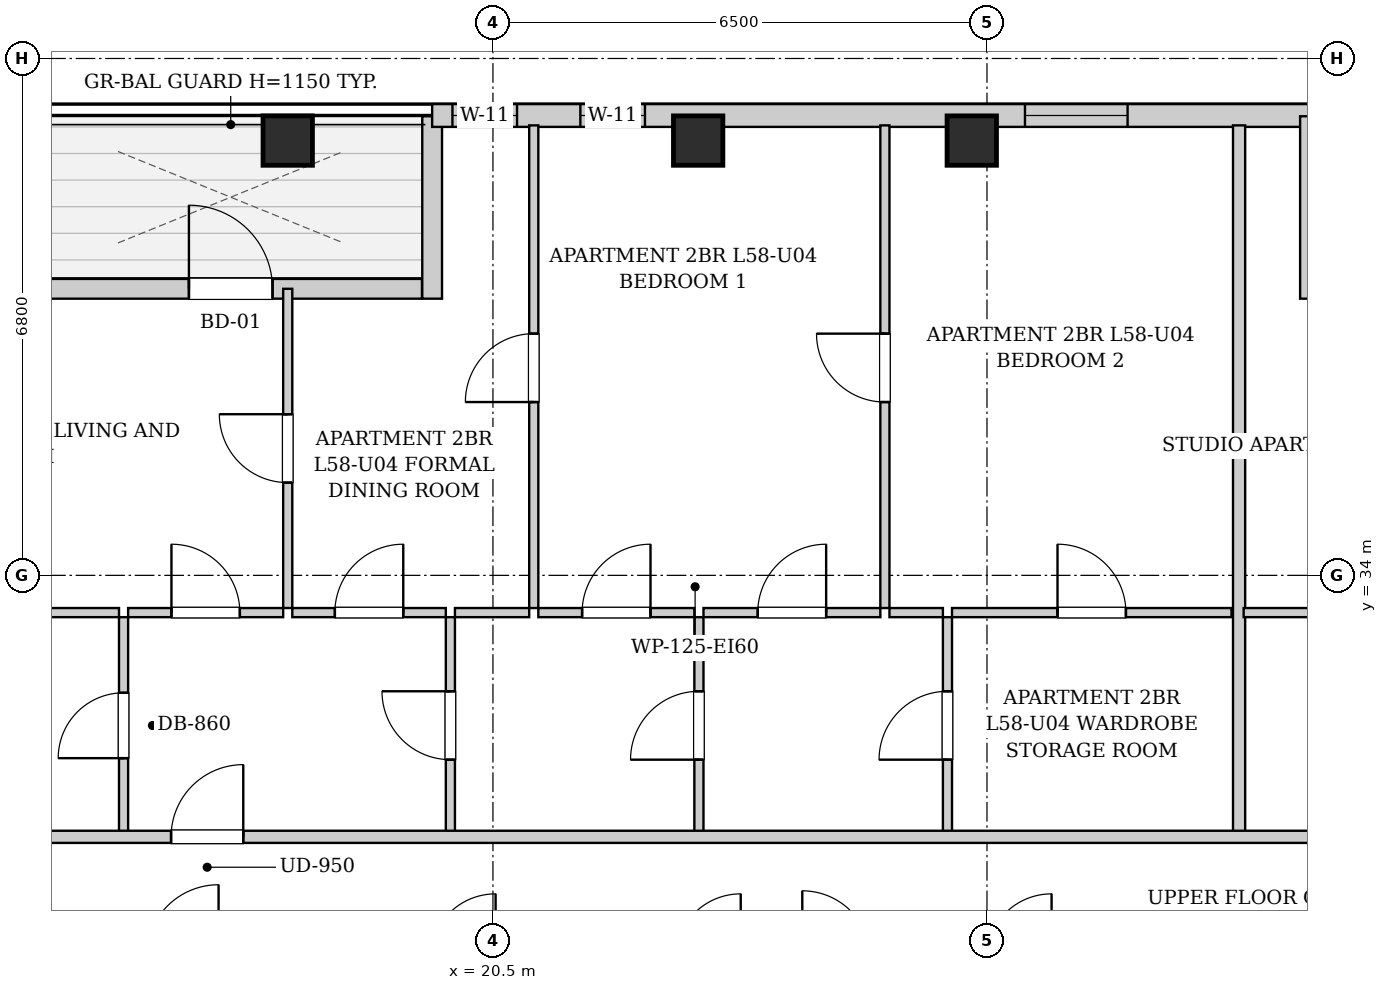
"""IFC4 building model, lengths in metres.
Left out: names, types, materials, properties, quantities, classifications, styles, units other than length and angle.
Written with IfcOpenShell. Run it as: python <this file> out.ifc"""

import sys

from ifc_helpers import new_model, si_unit, direction, frame, frame_2d, origin, origin_2d, place, context, subcontext, project, spatial, rectangle, extrude, element, fill, save


model = new_model("IFC4")
c1 = context("Model", 3, precision=1e-05, world=origin(), true_north=direction((0.0, 1.0)))
c2 = subcontext(c1, "Body", "Model", "MODEL_VIEW")
j1 = project(units=[si_unit("LENGTHUNIT", "METRE"), si_unit("PLANEANGLEUNIT", "RADIAN")], contexts=[c1])
p1 = place(None, origin())
s1 = spatial("IfcSite", under=j1, at=p1, CompositionType="ELEMENT")
p2 = place(p1, origin())
s2 = spatial("IfcBuilding", under=s1, at=p2, CompositionType="ELEMENT")
p3 = place(p2, frame((0.0, 0.0, 200.8)))
s3 = spatial("IfcBuildingStorey", under=s2, at=p3, CompositionType="ELEMENT", Elevation=200.8)
for number, where, z_axis, x_axis in (
    (1, (17.8, 39.72, 0.0), (0.0, 0.0, 1.0), (1.0, 0.0, 0.0)),
    (2, (23.2, 39.72, 0.0), (0.0, 0.0, 1.0), (1.0, 0.0, 0.0)),
    (3, (26.8, 39.72, 0.0), (0.0, 0.0, 1.0), (1.0, 0.0, 0.0)),
):
    element("IfcColumn", number, at=place(p3, frame(where, z_axis=z_axis, x_axis=x_axis)), inside=s3, PredefinedType="COLUMN", context=c2, shape_type="SweptSolid", body=[
        extrude(rectangle(XDim=0.65, YDim=0.65, at=origin_2d()), origin(), (0.0, 0.0, 1.0), 3.3),
    ])
p4 = place(p3, frame((14.534, 37.77, 0.0), z_axis=(0.0, 0.0, 1.0), x_axis=(1.0, 0.0, 0.0)))
e4 = element("IfcWall", 4, at=p4, inside=s3, PredefinedType="SOLIDWALL", context=c2, shape_type="SweptSolid", body=[
    extrude(rectangle(XDim=5.032, YDim=0.26, at=frame_2d((2.516, 0.0))), origin(), (0.0, 0.0, 1.0), 3.04),
])
p5 = place(p4, frame((1.966, 0.0, 0.0)))
e5 = element("IfcOpeningElement", 5, at=p5, cuts=e4, PredefinedType="OPENING", context=c2, shape_type="SweptSolid", body=[
    extrude(rectangle(XDim=1.1, YDim=2.0, at=frame_2d((0.55, 1.0))), frame((0.0, 0.14, 0.0), z_axis=(0.0, -1.0, 0.0), x_axis=(1.0, 0.0, 0.0)), (0.0, 0.0, 1.0), 0.28),
])
p6 = place(p3, frame((19.7, 37.64, 0.0), z_axis=(0.0, 0.0, 1.0), x_axis=(0.0, 1.0, 0.0)))
e6 = element("IfcWall", 6, at=p6, inside=s3, PredefinedType="SOLIDWALL", context=c2, shape_type="SweptSolid", body=[
    extrude(rectangle(XDim=2.4, YDim=0.26, at=frame_2d((1.2, 0.0))), origin(), (0.0, 0.0, 1.0), 3.04),
])
p7 = place(p3, frame((19.7, 40.05, 0.0), z_axis=(0.0, 0.0, 1.0), x_axis=(1.0, 0.0, 0.0)))
e7 = element("IfcWall", 7, at=p7, inside=s3, PredefinedType="SOLIDWALL", context=c2, shape_type="SweptSolid", body=[
    extrude(rectangle(XDim=11.55, YDim=0.3, at=frame_2d((5.775, 0.0))), origin(), (0.0, 0.0, 1.0), 3.04),
])
p8 = place(p7, frame((0.267, 0.0, 0.55)))
e8 = element("IfcOpeningElement", 8, at=p8, cuts=e7, PredefinedType="OPENING", context=c2, shape_type="SweptSolid", body=[
    extrude(rectangle(XDim=0.85, YDim=1.2, at=frame_2d((0.425, 0.6))), frame((0.0, 0.16, 0.0), z_axis=(0.0, -1.0, 0.0), x_axis=(1.0, 0.0, 0.0)), (0.0, 0.0, 1.0), 0.32),
])
p9 = place(p7, frame((1.95, 0.0, 0.55)))
e9 = element("IfcOpeningElement", 9, at=p9, cuts=e7, PredefinedType="OPENING", context=c2, shape_type="SweptSolid", body=[
    extrude(rectangle(XDim=0.85, YDim=1.2, at=frame_2d((0.425, 0.6))), frame((0.0, 0.16, 0.0), z_axis=(0.0, -1.0, 0.0), x_axis=(1.0, 0.0, 0.0)), (0.0, 0.0, 1.0), 0.32),
])
p10 = place(p7, frame((7.8, 0.0, 0.55)))
e10 = element("IfcOpeningElement", 10, at=p10, cuts=e7, PredefinedType="OPENING", context=c2, shape_type="SweptSolid", body=[
    extrude(rectangle(XDim=1.35, YDim=1.2, at=frame_2d((0.675, 0.6))), frame((0.0, 0.16, 0.0), z_axis=(0.0, -1.0, 0.0), x_axis=(1.0, 0.0, 0.0)), (0.0, 0.0, 1.0), 0.32),
])
p11 = place(p3, frame((31.25, 40.04, 0.0), z_axis=(0.0, 0.0, 1.0), x_axis=(0.0, -1.0, 0.0)))
e11 = element("IfcWall", 11, at=p11, inside=s3, PredefinedType="SOLIDWALL", context=c2, shape_type="SweptSolid", body=[
    extrude(rectangle(XDim=2.4, YDim=0.26, at=frame_2d((1.2, 0.0))), origin(), (0.0, 0.0, 1.0), 3.04),
])
p12 = place(p3, frame((15.64, 30.6, 0.0), z_axis=(0.0, 0.0, 1.0), x_axis=(0.0, 1.0, 0.0)))
e12 = element("IfcWall", 12, at=p12, inside=s3, PredefinedType="PARTITIONING", context=c2, shape_type="SweptSolid", body=[
    extrude(rectangle(XDim=2.85, YDim=0.12, at=frame_2d((1.425, 0.0))), origin(), (0.0, 0.0, 1.0), 3.04),
])
p13 = place(p12, frame((0.995, 0.0, 0.0)))
e13 = element("IfcOpeningElement", 13, at=p13, cuts=e12, PredefinedType="OPENING", context=c2, shape_type="SweptSolid", body=[
    extrude(rectangle(XDim=0.86, YDim=2.05, at=frame_2d((0.43, 1.025))), frame((0.0, 0.07, 0.0), z_axis=(0.0, -1.0, 0.0), x_axis=(1.0, 0.0, 0.0)), (0.0, 0.0, 1.0), 0.14),
])
p14 = place(p3, frame((13.18, 33.51, 0.0), z_axis=(0.0, 0.0, 1.0), x_axis=(1.0, 0.0, 0.0)))
e14 = element("IfcWall", 14, at=p14, inside=s3, PredefinedType="PARTITIONING", context=c2, shape_type="SweptSolid", body=[
    extrude(rectangle(XDim=2.4, YDim=0.12, at=frame_2d((1.2, 0.0))), origin(), (0.0, 0.0, 1.0), 3.04),
])
p15 = place(p3, frame((19.94, 30.6, 0.0), z_axis=(0.0, 0.0, 1.0), x_axis=(0.0, 1.0, 0.0)))
e15 = element("IfcWall", 15, at=p15, inside=s3, PredefinedType="PARTITIONING", context=c2, shape_type="SweptSolid", body=[
    extrude(rectangle(XDim=2.85, YDim=0.12, at=frame_2d((1.425, 0.0))), origin(), (0.0, 0.0, 1.0), 3.04),
])
p16 = place(p15, frame((0.975, 0.0, 0.0)))
e16 = element("IfcOpeningElement", 16, at=p16, cuts=e15, PredefinedType="OPENING", context=c2, shape_type="SweptSolid", body=[
    extrude(rectangle(XDim=0.9, YDim=2.05, at=frame_2d((0.45, 1.025))), frame((0.0, 0.07, 0.0), z_axis=(0.0, -1.0, 0.0), x_axis=(1.0, 0.0, 0.0)), (0.0, 0.0, 1.0), 0.14),
])
p17 = place(p3, frame((15.7, 33.51, 0.0), z_axis=(0.0, 0.0, 1.0), x_axis=(1.0, 0.0, 0.0)))
e17 = element("IfcWall", 17, at=p17, inside=s3, PredefinedType="PARTITIONING", context=c2, shape_type="SweptSolid", body=[
    extrude(rectangle(XDim=2.04, YDim=0.12, at=frame_2d((1.02, 0.0))), origin(), (0.0, 0.0, 1.0), 3.04),
])
p18 = place(p17, frame((0.57, 0.0, 0.0)))
e18 = element("IfcOpeningElement", 18, at=p18, cuts=e17, PredefinedType="OPENING", context=c2, shape_type="SweptSolid", body=[
    extrude(rectangle(XDim=0.9, YDim=2.05, at=frame_2d((0.45, 1.025))), frame((0.0, 0.07, 0.0), z_axis=(0.0, -1.0, 0.0), x_axis=(1.0, 0.0, 0.0)), (0.0, 0.0, 1.0), 0.14),
])
p19 = place(p3, frame((17.86, 33.51, 0.0), z_axis=(0.0, 0.0, 1.0), x_axis=(1.0, 0.0, 0.0)))
e19 = element("IfcWall", 19, at=p19, inside=s3, PredefinedType="PARTITIONING", context=c2, shape_type="SweptSolid", body=[
    extrude(rectangle(XDim=2.02, YDim=0.12, at=frame_2d((1.01, 0.0))), origin(), (0.0, 0.0, 1.0), 3.04),
])
p20 = place(p19, frame((0.56, 0.0, 0.0)))
e20 = element("IfcOpeningElement", 20, at=p20, cuts=e19, PredefinedType="OPENING", context=c2, shape_type="SweptSolid", body=[
    extrude(rectangle(XDim=0.9, YDim=2.05, at=frame_2d((0.45, 1.025))), frame((0.0, 0.07, 0.0), z_axis=(0.0, -1.0, 0.0), x_axis=(1.0, 0.0, 0.0)), (0.0, 0.0, 1.0), 0.14),
])
p21 = place(p3, frame((23.21, 30.6, 0.0), z_axis=(0.0, 0.0, 1.0), x_axis=(0.0, 1.0, 0.0)))
e21 = element("IfcWall", 21, at=p21, inside=s3, PredefinedType="PARTITIONING", context=c2, shape_type="SweptSolid", body=[
    extrude(rectangle(XDim=2.85, YDim=0.12, at=frame_2d((1.425, 0.0))), origin(), (0.0, 0.0, 1.0), 3.04),
])
p22 = place(p21, frame((0.975, 0.0, 0.0)))
e22 = element("IfcOpeningElement", 22, at=p22, cuts=e21, PredefinedType="OPENING", context=c2, shape_type="SweptSolid", body=[
    extrude(rectangle(XDim=0.9, YDim=2.05, at=frame_2d((0.45, 1.025))), frame((0.0, 0.07, 0.0), z_axis=(0.0, -1.0, 0.0), x_axis=(1.0, 0.0, 0.0)), (0.0, 0.0, 1.0), 0.14),
])
p23 = place(p3, frame((20.0, 33.51, 0.0), z_axis=(0.0, 0.0, 1.0), x_axis=(1.0, 0.0, 0.0)))
e23 = element("IfcWall", 23, at=p23, inside=s3, PredefinedType="PARTITIONING", context=c2, shape_type="SweptSolid", body=[
    extrude(rectangle(XDim=0.977, YDim=0.12, at=frame_2d((0.489, 0.0))), origin(), (0.0, 0.0, 1.0), 3.04),
])
p24 = place(p3, frame((21.097, 33.51, 0.0), z_axis=(0.0, 0.0, 1.0), x_axis=(1.0, 0.0, 0.0)))
e24 = element("IfcWall", 24, at=p24, inside=s3, PredefinedType="PARTITIONING", context=c2, shape_type="SweptSolid", body=[
    extrude(rectangle(XDim=2.053, YDim=0.12, at=frame_2d((1.026, 0.0))), origin(), (0.0, 0.0, 1.0), 3.04),
])
p25 = place(p24, frame((0.576, 0.0, 0.0)))
e25 = element("IfcOpeningElement", 25, at=p25, cuts=e24, PredefinedType="OPENING", context=c2, shape_type="SweptSolid", body=[
    extrude(rectangle(XDim=0.9, YDim=2.05, at=frame_2d((0.45, 1.025))), frame((0.0, 0.07, 0.0), z_axis=(0.0, -1.0, 0.0), x_axis=(1.0, 0.0, 0.0)), (0.0, 0.0, 1.0), 0.14),
])
p26 = place(p3, frame((26.48, 30.6, 0.0), z_axis=(0.0, 0.0, 1.0), x_axis=(0.0, 1.0, 0.0)))
e26 = element("IfcWall", 26, at=p26, inside=s3, PredefinedType="PARTITIONING", context=c2, shape_type="SweptSolid", body=[
    extrude(rectangle(XDim=2.85, YDim=0.12, at=frame_2d((1.425, 0.0))), origin(), (0.0, 0.0, 1.0), 3.04),
])
p27 = place(p26, frame((0.975, 0.0, 0.0)))
e27 = element("IfcOpeningElement", 27, at=p27, cuts=e26, PredefinedType="OPENING", context=c2, shape_type="SweptSolid", body=[
    extrude(rectangle(XDim=0.9, YDim=2.05, at=frame_2d((0.45, 1.025))), frame((0.0, 0.07, 0.0), z_axis=(0.0, -1.0, 0.0), x_axis=(1.0, 0.0, 0.0)), (0.0, 0.0, 1.0), 0.14),
])
p28 = place(p3, frame((23.27, 33.51, 0.0), z_axis=(0.0, 0.0, 1.0), x_axis=(1.0, 0.0, 0.0)))
e28 = element("IfcWall", 28, at=p28, inside=s3, PredefinedType="PARTITIONING", context=c2, shape_type="SweptSolid", body=[
    extrude(rectangle(XDim=2.327, YDim=0.12, at=frame_2d((1.164, 0.0))), origin(), (0.0, 0.0, 1.0), 3.04),
])
p29 = place(p28, frame((0.714, 0.0, 0.0)))
e29 = element("IfcOpeningElement", 29, at=p29, cuts=e28, PredefinedType="OPENING", context=c2, shape_type="SweptSolid", body=[
    extrude(rectangle(XDim=0.9, YDim=2.05, at=frame_2d((0.45, 1.025))), frame((0.0, 0.07, 0.0), z_axis=(0.0, -1.0, 0.0), x_axis=(1.0, 0.0, 0.0)), (0.0, 0.0, 1.0), 0.14),
])
p30 = place(p3, frame((25.717, 33.51, 0.0), z_axis=(0.0, 0.0, 1.0), x_axis=(1.0, 0.0, 0.0)))
e30 = element("IfcWall", 30, at=p30, inside=s3, PredefinedType="PARTITIONING", context=c2, shape_type="SweptSolid", body=[
    extrude(rectangle(XDim=0.703, YDim=0.12, at=frame_2d((0.352, 0.0))), origin(), (0.0, 0.0, 1.0), 3.04),
])
p31 = place(p3, frame((26.54, 33.51, 0.0), z_axis=(0.0, 0.0, 1.0), x_axis=(1.0, 0.0, 0.0)))
e31 = element("IfcWall", 31, at=p31, inside=s3, PredefinedType="PARTITIONING", context=c2, shape_type="SweptSolid", body=[
    extrude(rectangle(XDim=3.677, YDim=0.12, at=frame_2d((1.838, 0.0))), origin(), (0.0, 0.0, 1.0), 3.04),
])
p32 = place(p31, frame((1.388, 0.0, 0.0)))
e32 = element("IfcOpeningElement", 32, at=p32, cuts=e31, PredefinedType="OPENING", context=c2, shape_type="SweptSolid", body=[
    extrude(rectangle(XDim=0.9, YDim=2.05, at=frame_2d((0.45, 1.025))), frame((0.0, 0.07, 0.0), z_axis=(0.0, -1.0, 0.0), x_axis=(1.0, 0.0, 0.0)), (0.0, 0.0, 1.0), 0.14),
])
p33 = place(p3, frame((17.8, 33.57, 0.0), z_axis=(0.0, 0.0, 1.0), x_axis=(0.0, 1.0, 0.0)))
e33 = element("IfcWall", 33, at=p33, inside=s3, PredefinedType="PARTITIONING", context=c2, shape_type="SweptSolid", body=[
    extrude(rectangle(XDim=4.2, YDim=0.12, at=frame_2d((2.1, 0.0))), origin(), (0.0, 0.0, 1.0), 2.556),
])
p34 = place(p33, frame((1.65, 0.0, 0.0)))
e34 = element("IfcOpeningElement", 34, at=p34, cuts=e33, PredefinedType="OPENING", context=c2, shape_type="SweptSolid", body=[
    extrude(rectangle(XDim=0.9, YDim=2.05, at=frame_2d((0.45, 1.025))), frame((0.0, 0.07, 0.0), z_axis=(0.0, -1.0, 0.0), x_axis=(1.0, 0.0, 0.0)), (0.0, 0.0, 1.0), 0.14),
])
p35 = place(p3, frame((21.037, 33.57, 0.0), z_axis=(0.0, 0.0, 1.0), x_axis=(0.0, 1.0, 0.0)))
e35 = element("IfcWall", 35, at=p35, inside=s3, PredefinedType="PARTITIONING", context=c2, shape_type="SweptSolid", body=[
    extrude(rectangle(XDim=6.35, YDim=0.12, at=frame_2d((3.175, 0.0))), origin(), (0.0, 0.0, 1.0), 3.04),
])
p36 = place(p35, frame((2.71, 0.0, 0.0)))
e36 = element("IfcOpeningElement", 36, at=p36, cuts=e35, PredefinedType="OPENING", context=c2, shape_type="SweptSolid", body=[
    extrude(rectangle(XDim=0.9, YDim=2.05, at=frame_2d((0.45, 1.025))), frame((0.0, 0.07, 0.0), z_axis=(0.0, -1.0, 0.0), x_axis=(1.0, 0.0, 0.0)), (0.0, 0.0, 1.0), 0.14),
])
p37 = place(p3, frame((25.657, 33.57, 0.0), z_axis=(0.0, 0.0, 1.0), x_axis=(0.0, 1.0, 0.0)))
e37 = element("IfcWall", 37, at=p37, inside=s3, PredefinedType="PARTITIONING", context=c2, shape_type="SweptSolid", body=[
    extrude(rectangle(XDim=6.35, YDim=0.12, at=frame_2d((3.175, 0.0))), origin(), (0.0, 0.0, 1.0), 3.04),
])
p38 = place(p37, frame((2.71, 0.0, 0.0)))
e38 = element("IfcOpeningElement", 38, at=p38, cuts=e37, PredefinedType="OPENING", context=c2, shape_type="SweptSolid", body=[
    extrude(rectangle(XDim=0.9, YDim=2.05, at=frame_2d((0.45, 1.025))), frame((0.0, 0.07, 0.0), z_axis=(0.0, -1.0, 0.0), x_axis=(1.0, 0.0, 0.0)), (0.0, 0.0, 1.0), 0.14),
])
p39 = place(p3, frame((30.317, 30.6, 0.0), z_axis=(0.0, 0.0, 1.0), x_axis=(0.0, 1.0, 0.0)))
e39 = element("IfcWall", 39, at=p39, inside=s3, PredefinedType="PARTITIONING", context=c2, shape_type="SweptSolid", body=[
    extrude(rectangle(XDim=9.32, YDim=0.16, at=frame_2d((4.66, 0.0))), origin(), (0.0, 0.0, 1.0), 3.04),
])
p40 = place(p3, frame((30.377, 33.51, 0.0), z_axis=(0.0, 0.0, 1.0), x_axis=(1.0, 0.0, 0.0)))
e40 = element("IfcWall", 40, at=p40, inside=s3, PredefinedType="PARTITIONING", context=c2, shape_type="SweptSolid", body=[
    extrude(rectangle(XDim=2.203, YDim=0.12, at=frame_2d((1.102, 0.0))), origin(), (0.0, 0.0, 1.0), 3.04),
])
p41 = place(p3, frame((13.15, 30.56, 0.0), z_axis=(0.0, 0.0, 1.0), x_axis=(1.0, 0.0, 0.0)))
e41 = element("IfcWall", 41, at=p41, inside=s3, PredefinedType="PARTITIONING", context=c2, shape_type="SweptSolid", body=[
    extrude(rectangle(XDim=24.6, YDim=0.16, at=frame_2d((12.3, 0.0))), origin(), (0.0, 0.0, 1.0), 3.04),
])
p42 = place(p41, frame((3.115, 0.0, 0.0)))
e42 = element("IfcOpeningElement", 42, at=p42, cuts=e41, PredefinedType="OPENING", context=c2, shape_type="SweptSolid", body=[
    extrude(rectangle(XDim=0.95, YDim=2.1, at=frame_2d((0.475, 1.05))), frame((0.0, 0.09, 0.0), z_axis=(0.0, -1.0, 0.0), x_axis=(1.0, 0.0, 0.0)), (0.0, 0.0, 1.0), 0.18),
])
p43 = place(p41, frame((21.55, 0.0, 0.0)))
e43 = element("IfcOpeningElement", 43, at=p43, cuts=e41, PredefinedType="OPENING", context=c2, shape_type="SweptSolid", body=[
    extrude(rectangle(XDim=0.95, YDim=2.1, at=frame_2d((0.475, 1.05))), frame((0.0, 0.09, 0.0), z_axis=(0.0, -1.0, 0.0), x_axis=(1.0, 0.0, 0.0)), (0.0, 0.0, 1.0), 0.18),
])
p44 = place(p13, origin())
e44 = element("IfcDoor", 44, at=p44, inside=s3, OperationType="SINGLE_SWING_LEFT", PredefinedType="DOOR", context=c2, shape_type="SweptSolid", body=[
    extrude(rectangle(XDim=0.86, YDim=2.05, at=frame_2d((0.43, 1.025))), frame((0.0, 0.025, 0.0), z_axis=(0.0, -1.0, 0.0), x_axis=(1.0, 0.0, 0.0)), (0.0, 0.0, 1.0), 0.05),
])
fill(e13, e44)
p45 = place(p16, origin())
e45 = element("IfcDoor", 45, at=p45, inside=s3, OperationType="SINGLE_SWING_RIGHT", PredefinedType="DOOR", context=c2, shape_type="SweptSolid", body=[
    extrude(rectangle(XDim=0.9, YDim=2.05, at=frame_2d((0.45, 1.025))), frame((0.0, 0.025, 0.0), z_axis=(0.0, -1.0, 0.0), x_axis=(1.0, 0.0, 0.0)), (0.0, 0.0, 1.0), 0.05),
])
fill(e16, e45)
p46 = place(p18, origin())
e46 = element("IfcDoor", 46, at=p46, inside=s3, OperationType="SINGLE_SWING_LEFT", PredefinedType="DOOR", context=c2, shape_type="SweptSolid", body=[
    extrude(rectangle(XDim=0.9, YDim=2.05, at=frame_2d((0.45, 1.025))), frame((0.0, 0.025, 0.0), z_axis=(0.0, -1.0, 0.0), x_axis=(1.0, 0.0, 0.0)), (0.0, 0.0, 1.0), 0.05),
])
fill(e18, e46)
p47 = place(p20, origin())
e47 = element("IfcDoor", 47, at=p47, inside=s3, OperationType="SINGLE_SWING_RIGHT", PredefinedType="DOOR", context=c2, shape_type="SweptSolid", body=[
    extrude(rectangle(XDim=0.9, YDim=2.05, at=frame_2d((0.45, 1.025))), frame((0.0, 0.025, 0.0), z_axis=(0.0, -1.0, 0.0), x_axis=(1.0, 0.0, 0.0)), (0.0, 0.0, 1.0), 0.05),
])
fill(e20, e47)
p48 = place(p22, origin())
e48 = element("IfcDoor", 48, at=p48, inside=s3, OperationType="SINGLE_SWING_LEFT", PredefinedType="DOOR", context=c2, shape_type="SweptSolid", body=[
    extrude(rectangle(XDim=0.9, YDim=2.05, at=frame_2d((0.45, 1.025))), frame((0.0, 0.025, 0.0), z_axis=(0.0, -1.0, 0.0), x_axis=(1.0, 0.0, 0.0)), (0.0, 0.0, 1.0), 0.05),
])
fill(e22, e48)
p49 = place(p25, origin())
e49 = element("IfcDoor", 49, at=p49, inside=s3, OperationType="SINGLE_SWING_RIGHT", PredefinedType="DOOR", context=c2, shape_type="SweptSolid", body=[
    extrude(rectangle(XDim=0.9, YDim=2.05, at=frame_2d((0.45, 1.025))), frame((0.0, 0.025, 0.0), z_axis=(0.0, -1.0, 0.0), x_axis=(1.0, 0.0, 0.0)), (0.0, 0.0, 1.0), 0.05),
])
fill(e25, e49)
p50 = place(p27, origin())
e50 = element("IfcDoor", 50, at=p50, inside=s3, OperationType="SINGLE_SWING_LEFT", PredefinedType="DOOR", context=c2, shape_type="SweptSolid", body=[
    extrude(rectangle(XDim=0.9, YDim=2.05, at=frame_2d((0.45, 1.025))), frame((0.0, 0.025, 0.0), z_axis=(0.0, -1.0, 0.0), x_axis=(1.0, 0.0, 0.0)), (0.0, 0.0, 1.0), 0.05),
])
fill(e27, e50)
p51 = place(p29, origin())
e51 = element("IfcDoor", 51, at=p51, inside=s3, OperationType="SINGLE_SWING_RIGHT", PredefinedType="DOOR", context=c2, shape_type="SweptSolid", body=[
    extrude(rectangle(XDim=0.9, YDim=2.05, at=frame_2d((0.45, 1.025))), frame((0.0, 0.025, 0.0), z_axis=(0.0, -1.0, 0.0), x_axis=(1.0, 0.0, 0.0)), (0.0, 0.0, 1.0), 0.05),
])
fill(e29, e51)
p52 = place(p32, origin())
e52 = element("IfcDoor", 52, at=p52, inside=s3, OperationType="SINGLE_SWING_LEFT", PredefinedType="DOOR", context=c2, shape_type="SweptSolid", body=[
    extrude(rectangle(XDim=0.9, YDim=2.05, at=frame_2d((0.45, 1.025))), frame((0.0, 0.025, 0.0), z_axis=(0.0, -1.0, 0.0), x_axis=(1.0, 0.0, 0.0)), (0.0, 0.0, 1.0), 0.05),
])
fill(e32, e52)
p53 = place(p34, origin())
e53 = element("IfcDoor", 53, at=p53, inside=s3, OperationType="SINGLE_SWING_RIGHT", PredefinedType="DOOR", context=c2, shape_type="SweptSolid", body=[
    extrude(rectangle(XDim=0.9, YDim=2.05, at=frame_2d((0.45, 1.025))), frame((0.0, 0.025, 0.0), z_axis=(0.0, -1.0, 0.0), x_axis=(1.0, 0.0, 0.0)), (0.0, 0.0, 1.0), 0.05),
])
fill(e34, e53)
p54 = place(p36, origin())
e54 = element("IfcDoor", 54, at=p54, inside=s3, OperationType="SINGLE_SWING_LEFT", PredefinedType="DOOR", context=c2, shape_type="SweptSolid", body=[
    extrude(rectangle(XDim=0.9, YDim=2.05, at=frame_2d((0.45, 1.025))), frame((0.0, 0.025, 0.0), z_axis=(0.0, -1.0, 0.0), x_axis=(1.0, 0.0, 0.0)), (0.0, 0.0, 1.0), 0.05),
])
fill(e36, e54)
p55 = place(p38, origin())
e55 = element("IfcDoor", 55, at=p55, inside=s3, OperationType="SINGLE_SWING_RIGHT", PredefinedType="DOOR", context=c2, shape_type="SweptSolid", body=[
    extrude(rectangle(XDim=0.9, YDim=2.05, at=frame_2d((0.45, 1.025))), frame((0.0, 0.025, 0.0), z_axis=(0.0, -1.0, 0.0), x_axis=(1.0, 0.0, 0.0)), (0.0, 0.0, 1.0), 0.05),
])
fill(e38, e55)
p56 = place(p42, origin())
e56 = element("IfcDoor", 56, at=p56, inside=s3, OperationType="SINGLE_SWING_RIGHT", PredefinedType="DOOR", context=c2, shape_type="SweptSolid", body=[
    extrude(rectangle(XDim=0.95, YDim=2.1, at=frame_2d((0.475, 1.05))), frame((0.0, 0.025, 0.0), z_axis=(0.0, -1.0, 0.0), x_axis=(1.0, 0.0, 0.0)), (0.0, 0.0, 1.0), 0.05),
])
fill(e42, e56)
p57 = place(p5, origin())
e57 = element("IfcDoor", 57, at=p57, inside=s3, OperationType="SINGLE_SWING_LEFT", PredefinedType="DOOR", context=c2, shape_type="SweptSolid", body=[
    extrude(rectangle(XDim=1.1, YDim=2.0, at=frame_2d((0.55, 1.0))), frame((0.0, 0.025, 0.0), z_axis=(0.0, -1.0, 0.0), x_axis=(1.0, 0.0, 0.0)), (0.0, 0.0, 1.0), 0.05),
])
fill(e5, e57)
p58 = place(p8, origin())
e58 = element("IfcWindow", 58, at=p58, inside=s3, PartitioningType="SINGLE_PANEL", PredefinedType="WINDOW", context=c2, shape_type="SweptSolid", body=[
    extrude(rectangle(XDim=0.85, YDim=1.2, at=frame_2d((0.425, 0.6))), frame((0.0, 0.03, 0.0), z_axis=(0.0, -1.0, 0.0), x_axis=(1.0, 0.0, 0.0)), (0.0, 0.0, 1.0), 0.06),
])
fill(e8, e58)
p59 = place(p9, origin())
e59 = element("IfcWindow", 59, at=p59, inside=s3, PartitioningType="SINGLE_PANEL", PredefinedType="WINDOW", context=c2, shape_type="SweptSolid", body=[
    extrude(rectangle(XDim=0.85, YDim=1.2, at=frame_2d((0.425, 0.6))), frame((0.0, 0.03, 0.0), z_axis=(0.0, -1.0, 0.0), x_axis=(1.0, 0.0, 0.0)), (0.0, 0.0, 1.0), 0.06),
])
fill(e9, e59)
p60 = place(p10, origin())
e60 = element("IfcWindow", 60, at=p60, inside=s3, PartitioningType="SINGLE_PANEL", PredefinedType="WINDOW", context=c2, shape_type="SweptSolid", body=[
    extrude(rectangle(XDim=1.35, YDim=1.2, at=frame_2d((0.675, 0.6))), frame((0.0, 0.03, 0.0), z_axis=(0.0, -1.0, 0.0), x_axis=(1.0, 0.0, 0.0)), (0.0, 0.0, 1.0), 0.06),
])
fill(e10, e60)
save(model, sys.argv[1])
